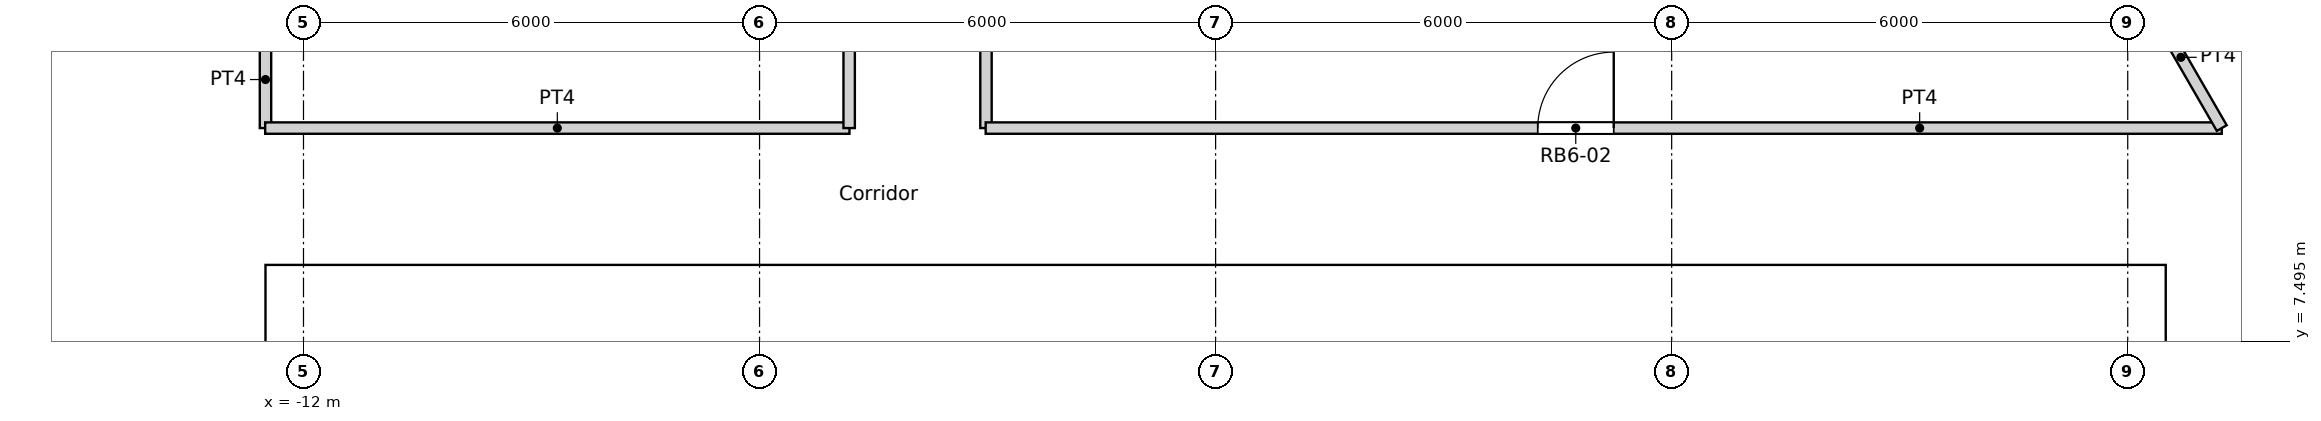
"""IFC4 building model, lengths in metres.
Left out: names, types, materials, properties, quantities, classifications, styles, units other than length and angle.
Written with IfcOpenShell. Run it as: python <this file> out.ifc"""

import sys

from ifc_helpers import new_model, si_unit, direction, frame, frame_2d, origin, place, context, subcontext, project, spatial, rectangle, extrude, element, fill, save


model = new_model("IFC4")
c1 = context("Model", 3, precision=1e-05, world=origin(), true_north=direction((0.0, 1.0)))
c2 = subcontext(c1, "Body", "Model", "MODEL_VIEW")
j1 = project(units=[si_unit("LENGTHUNIT", "METRE"), si_unit("PLANEANGLEUNIT", "RADIAN")], contexts=[c1])
p1 = place(None, origin())
s1 = spatial("IfcSite", under=j1, at=p1, CompositionType="ELEMENT")
p2 = place(p1, origin())
s2 = spatial("IfcBuilding", under=s1, at=p2, CompositionType="ELEMENT")
p3 = place(p2, frame((0.0, 0.0, 180.0)))
s3 = spatial("IfcBuildingStorey", under=s2, at=p3, CompositionType="ELEMENT", Elevation=180.0)
p4 = place(p3, frame((-12.5, 8.05, 0.0), z_axis=(0.0, 0.0, 1.0), x_axis=(1.0, 0.0, 0.0)))
e1 = element("IfcWall", 1, at=p4, inside=s3, PredefinedType="SOLIDWALL", context=c2, shape_type="SweptSolid", body=[
    extrude(rectangle(XDim=25.0, YDim=0.9, at=frame_2d((12.5, 0.0))), origin(), (0.0, 0.0, 1.0), 3.6),
])
p5 = place(p4, frame((8.3, 0.0, 0.0)))
e2 = element("IfcOpeningElement", 2, at=p5, cuts=e1, PredefinedType="OPENING", context=c2, shape_type="SweptSolid", body=[
    extrude(rectangle(XDim=1.8, YDim=2.1, at=frame_2d((0.9, 1.05))), frame((0.0, 0.45, 0.0), z_axis=(0.0, -1.0, 0.0), x_axis=(1.0, 0.0, 0.0)), (0.0, 0.0, 1.0), 0.9),
])
p6 = place(p3, frame((-12.05, -7.6, 0.0), z_axis=(0.0, 0.0, 1.0), x_axis=(0.0, 1.0, 0.0)))
e3 = element("IfcWall", 3, at=p6, inside=s3, PredefinedType="SOLIDWALL", context=c2, shape_type="SweptSolid", body=[
    extrude(rectangle(XDim=15.2, YDim=0.9, at=frame_2d((7.6, 0.0))), origin(), (0.0, 0.0, 1.0), 3.6),
])
p7 = place(p6, frame((7.1, 0.0, 0.0)))
e4 = element("IfcOpeningElement", 4, at=p7, cuts=e3, PredefinedType="OPENING", context=c2, shape_type="SweptSolid", body=[
    extrude(rectangle(XDim=1.0, YDim=2.1, at=frame_2d((0.5, 1.05))), frame((0.0, 0.45, 0.0), z_axis=(0.0, -1.0, 0.0), x_axis=(1.0, 0.0, 0.0)), (0.0, 0.0, 1.0), 0.9),
])
p8 = place(p3, frame((12.05, -7.6, 0.0), z_axis=(0.0, 0.0, 1.0), x_axis=(0.0, 1.0, 0.0)))
e5 = element("IfcWall", 5, at=p8, inside=s3, PredefinedType="SOLIDWALL", context=c2, shape_type="SweptSolid", body=[
    extrude(rectangle(XDim=15.2, YDim=0.9, at=frame_2d((7.6, 0.0))), origin(), (0.0, 0.0, 1.0), 3.6),
])
p9 = place(p8, frame((5.1, 0.0, 0.0)))
e6 = element("IfcOpeningElement", 6, at=p9, cuts=e5, PredefinedType="OPENING", context=c2, shape_type="SweptSolid", body=[
    extrude(rectangle(XDim=1.0, YDim=2.1, at=frame_2d((0.5, 1.05))), frame((0.0, 0.45, 0.0), z_axis=(0.0, -1.0, 0.0), x_axis=(1.0, 0.0, 0.0)), (0.0, 0.0, 1.0), 0.9),
])
for number, where, z_axis, x_axis in (
    (7, (-2.25, 3.25, 0.0), (0.0, 0.0, 1.0), (0.0, 1.0, 0.0)),
    (8, (0.55, 3.25, 0.0), (0.0, 0.0, 1.0), (0.0, 1.0, 0.0)),
):
    element("IfcWall", number, at=place(p3, frame(where, z_axis=z_axis, x_axis=x_axis)), inside=s3, PredefinedType="SOLIDWALL", context=c2, shape_type="SweptSolid", body=[
        extrude(rectangle(XDim=4.35, YDim=0.3, at=frame_2d((2.175, 0.0))), origin(), (0.0, 0.0, 1.0), 3.3),
    ])
p10 = place(p3, frame((-9.05, -7.0, 0.0), z_axis=(0.0, 0.0, 1.0), x_axis=(0.0, 1.0, 0.0)))
e9 = element("IfcWall", 9, at=p10, inside=s3, PredefinedType="SOLIDWALL", context=c2, shape_type="SweptSolid", body=[
    extrude(rectangle(XDim=14.6, YDim=0.3, at=frame_2d((7.3, 0.0))), origin(), (0.0, 0.0, 1.0), 3.3),
])
p11 = place(p3, frame((-4.275, 6.7, 0.0), z_axis=(0.0, 0.0, 1.0), x_axis=(0.0, 1.0, 0.0)))
e10 = element("IfcWall", 10, at=p11, inside=s3, PredefinedType="SOLIDWALL", context=c2, shape_type="SweptSolid", body=[
    extrude(rectangle(XDim=0.9, YDim=0.15, at=frame_2d((0.45, 0.0))), origin(), (0.0, 0.0, 1.0), 3.3),
])
p12 = place(p3, frame((0.7, 7.15, 0.0), z_axis=(0.0, 0.0, 1.0), x_axis=(1.0, 0.0, 0.0)))
e11 = element("IfcWall", 11, at=p12, inside=s3, PredefinedType="SOLIDWALL", context=c2, shape_type="SweptSolid", body=[
    extrude(rectangle(XDim=8.35, YDim=0.9, at=frame_2d((4.175, 0.0))), origin(), (0.0, 0.0, 1.0), 3.3),
])
p13 = place(p3, frame((-12.504, 10.3, 0.0), z_axis=(0.0, 0.0, 1.0), x_axis=(1.0, 0.0, 0.0)))
e12 = element("IfcWall", 12, at=p13, inside=s3, PredefinedType="PARTITIONING", context=c2, shape_type="SweptSolid", body=[
    extrude(rectangle(XDim=7.687, YDim=0.15, at=frame_2d((3.844, 0.0))), origin(), (0.0, 0.0, 1.0), 3.3),
])
p14 = place(p3, frame((-3.025, 10.3, 0.0), z_axis=(0.0, 0.0, 1.0), x_axis=(1.0, 0.0, 0.0)))
e13 = element("IfcWall", 13, at=p14, inside=s3, PredefinedType="PARTITIONING", context=c2, shape_type="SweptSolid", body=[
    extrude(rectangle(XDim=16.262, YDim=0.15, at=frame_2d((8.131, 0.0))), origin(), (0.0, 0.0, 1.0), 3.3),
])
p15 = place(p14, frame((7.263, 0.0, 0.0)))
e14 = element("IfcOpeningElement", 14, at=p15, cuts=e13, PredefinedType="OPENING", context=c2, shape_type="SweptSolid", body=[
    extrude(rectangle(XDim=1.0, YDim=2.04, at=frame_2d((0.5, 1.02))), frame((0.0, 0.075, 0.0), z_axis=(0.0, -1.0, 0.0), x_axis=(1.0, 0.0, 0.0)), (0.0, 0.0, 1.0), 0.15),
])
p16 = place(p3, frame((12.162, 12.162, 0.0), z_axis=(0.0, 0.0, 1.0), x_axis=(0.499961633463, -0.866047553582, 0.0)))
e15 = element("IfcWall", 15, at=p16, inside=s3, PredefinedType="PARTITIONING", context=c2, shape_type="SweptSolid", body=[
    extrude(rectangle(XDim=2.15, YDim=0.15, at=frame_2d((1.075, 0.0))), origin(), (0.0, 0.0, 1.0), 3.3),
])
p17 = place(p3, frame((-4.821, 10.3, 0.0), z_axis=(0.0, 0.0, 1.0), x_axis=(0.0, 1.0, 0.0)))
e16 = element("IfcWall", 16, at=p17, inside=s3, PredefinedType="PARTITIONING", context=c2, shape_type="SweptSolid", body=[
    extrude(rectangle(XDim=6.101, YDim=0.15, at=frame_2d((3.05, 0.0))), origin(), (0.0, 0.0, 1.0), 3.3),
])
p18 = place(p3, frame((-3.021, 10.3, 0.0), z_axis=(0.0, 0.0, 1.0), x_axis=(0.0, 1.0, 0.0)))
e17 = element("IfcWall", 17, at=p18, inside=s3, PredefinedType="PARTITIONING", context=c2, shape_type="SweptSolid", body=[
    extrude(rectangle(XDim=6.314, YDim=0.15, at=frame_2d((3.157, 0.0))), origin(), (0.0, 0.0, 1.0), 3.3),
])
p19 = place(p3, frame((-12.5, 10.3, 0.0), z_axis=(0.0, 0.0, 1.0), x_axis=(0.0, 1.0, 0.0)))
e18 = element("IfcWall", 18, at=p19, inside=s3, PredefinedType="PARTITIONING", context=c2, shape_type="SweptSolid", body=[
    extrude(rectangle(XDim=1.277, YDim=0.15, at=frame_2d((0.638, 0.0))), origin(), (0.0, 0.0, 1.0), 3.3),
])
p20 = place(p3, frame((-19.351, 4.586, 0.0), z_axis=(0.0, 0.0, 1.0), x_axis=(0.44867140262, 0.893696801198, 0.0)))
e19 = element("IfcWall", 19, at=p20, inside=s3, PredefinedType="PARTITIONING", context=c2, shape_type="SweptSolid", body=[
    extrude(rectangle(XDim=9.174, YDim=0.15, at=frame_2d((4.587, 0.0))), origin(), (0.0, 0.0, 1.0), 3.3),
])
p21 = place(p20, frame((0.615, 0.0, 0.0)))
e20 = element("IfcOpeningElement", 20, at=p21, cuts=e19, PredefinedType="OPENING", context=c2, shape_type="SweptSolid", body=[
    extrude(rectangle(XDim=1.1, YDim=2.1, at=frame_2d((0.55, 1.05))), frame((0.0, 0.075, 0.0), z_axis=(0.0, -1.0, 0.0), x_axis=(1.0, 0.0, 0.0)), (0.0, 0.0, 1.0), 0.15),
])
p22 = place(p5, origin())
e21 = element("IfcDoor", 21, at=p22, inside=s3, OperationType="DOUBLE_DOOR_SINGLE_SWING", PredefinedType="DOOR", context=c2, shape_type="SweptSolid", body=[
    extrude(rectangle(XDim=1.8, YDim=2.1, at=frame_2d((0.9, 1.05))), frame((0.0, 0.025, 0.0), z_axis=(0.0, -1.0, 0.0), x_axis=(1.0, 0.0, 0.0)), (0.0, 0.0, 1.0), 0.05),
])
fill(e2, e21)
p23 = place(p15, origin())
e22 = element("IfcDoor", 22, at=p23, inside=s3, OperationType="SINGLE_SWING_RIGHT", PredefinedType="DOOR", context=c2, shape_type="SweptSolid", body=[
    extrude(rectangle(XDim=1.0, YDim=2.04, at=frame_2d((0.5, 1.02))), frame((0.0, 0.025, 0.0), z_axis=(0.0, -1.0, 0.0), x_axis=(1.0, 0.0, 0.0)), (0.0, 0.0, 1.0), 0.05),
])
fill(e14, e22)
save(model, sys.argv[1])
